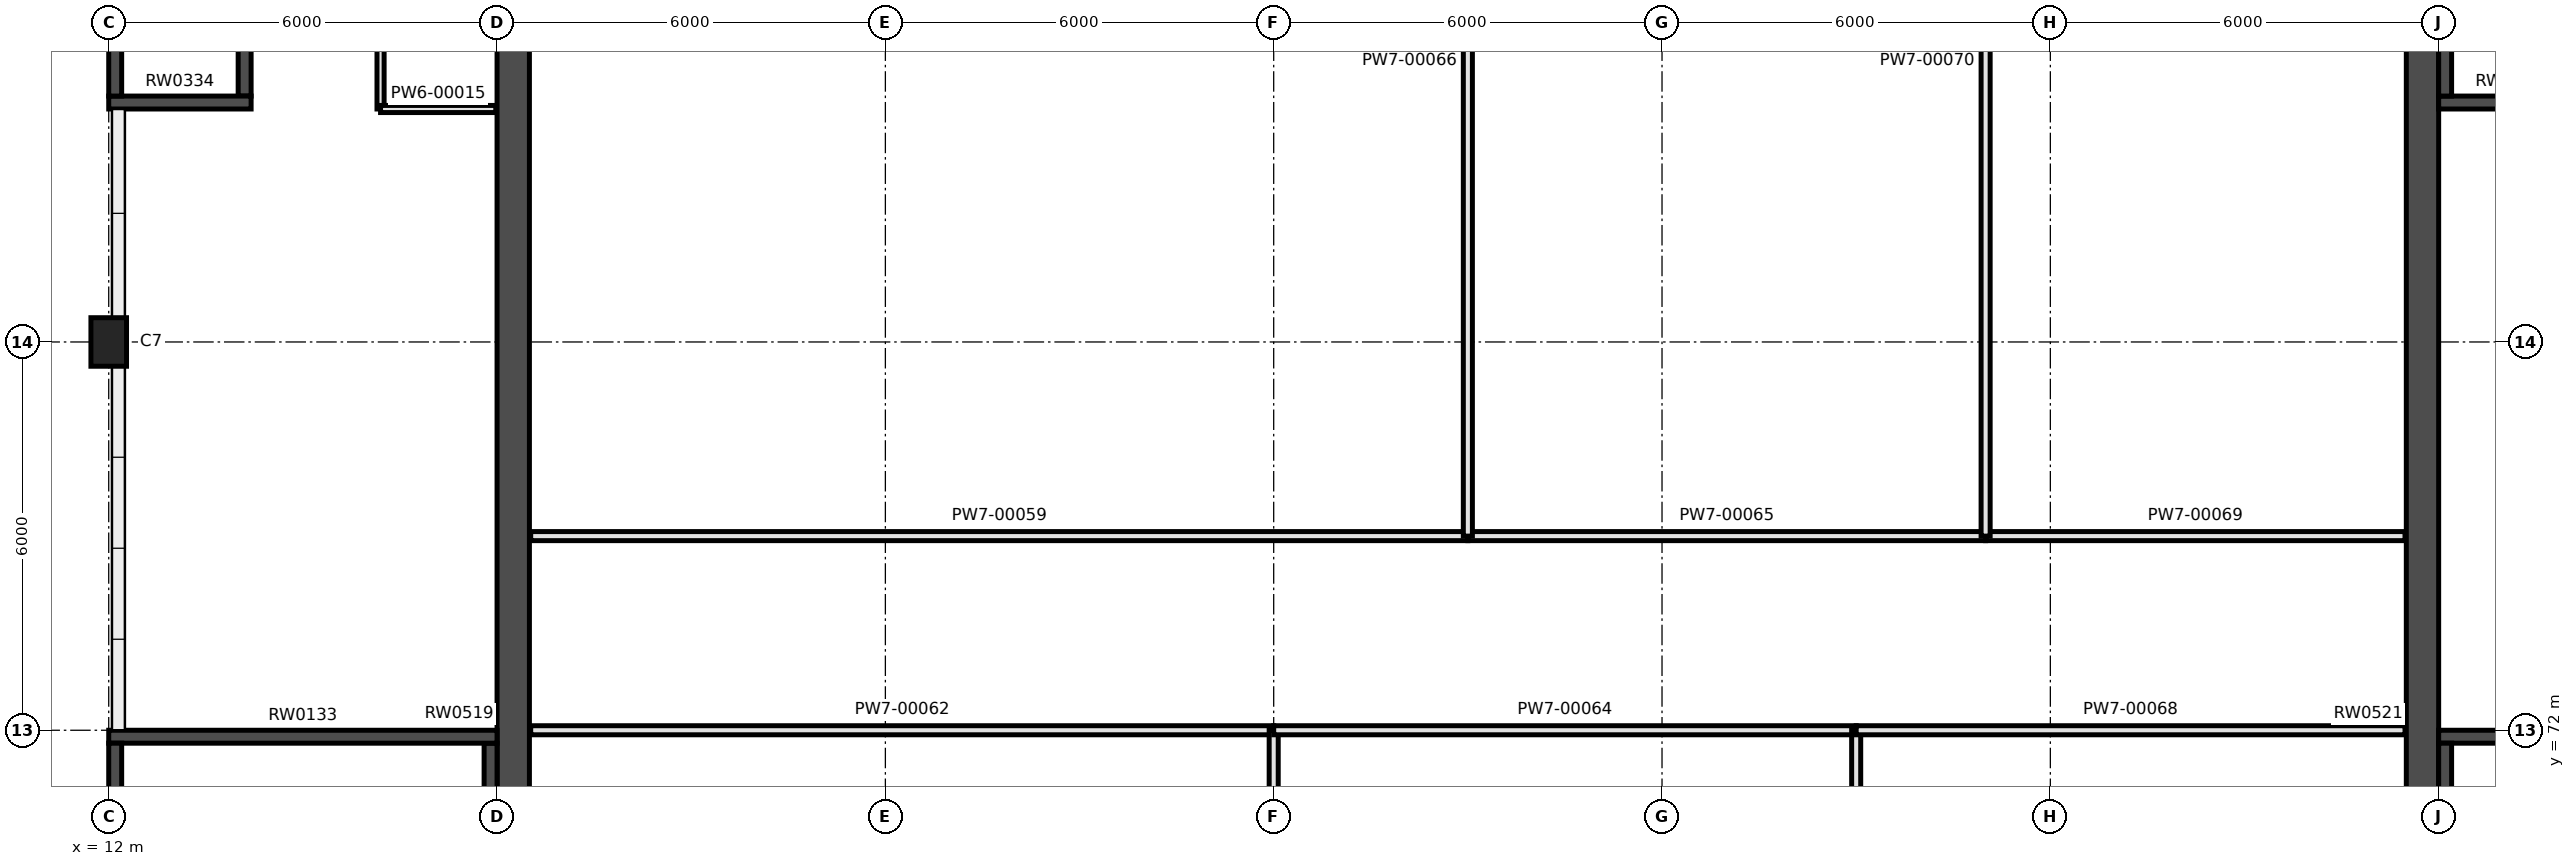
"""IFC4 building model, lengths in metres.
Left out: names, types, materials, properties, quantities, classifications, styles, units other than length and angle.
Written with IfcOpenShell. Run it as: python <this file> out.ifc"""

import sys

from ifc_helpers import new_model, si_unit, direction, frame, frame_2d, origin, origin_2d, place, context, subcontext, project, spatial, rectangle, extrude, element, fill, save


model = new_model("IFC4")
c1 = context("Model", 3, precision=1e-05, world=origin(), true_north=direction((0.0, 1.0)))
c2 = subcontext(c1, "Body", "Model", "MODEL_VIEW")
j1 = project(units=[si_unit("LENGTHUNIT", "METRE"), si_unit("PLANEANGLEUNIT", "RADIAN")], contexts=[c1])
p1 = place(None, origin())
s1 = spatial("IfcSite", under=j1, at=p1, CompositionType="ELEMENT")
p2 = place(p1, origin())
s2 = spatial("IfcBuilding", under=s1, at=p2, CompositionType="ELEMENT")
p3 = place(p2, origin())
s3 = spatial("IfcBuildingStorey", under=s2, at=p3, CompositionType="ELEMENT", Elevation=0.0)
p4 = place(p3, frame((12.0, 78.0, -0.3), z_axis=(0.0, 0.0, 1.0), x_axis=(1.0, 0.0, 0.0)))
e1 = element("IfcColumn", 1, at=p4, inside=s3, PredefinedType="COLUMN", context=c2, shape_type="SweptSolid", body=[
    extrude(rectangle(XDim=0.55, YDim=0.75, at=origin_2d()), origin(), (0.0, 0.0, 1.0), 7.3),
])
p5 = place(p3, frame((12.0, 71.9, -0.3), z_axis=(0.0, 0.0, 1.0), x_axis=(1.0, 0.0, 0.0)))
e2 = element("IfcWall", 2, at=p5, inside=s3, PredefinedType="SHEAR", context=c2, shape_type="SweptSolid", body=[
    extrude(rectangle(XDim=6.0, YDim=0.2, at=frame_2d((3.0, 0.0))), origin(), (0.0, 0.0, 1.0), 7.3),
])
p6 = place(p5, frame((0.3, 0.0, 0.3)))
e3 = element("IfcOpeningElement", 3, at=p6, cuts=e2, PredefinedType="OPENING", context=c2, shape_type="SweptSolid", body=[
    extrude(rectangle(XDim=1.1, YDim=2.2, at=frame_2d((0.55, 1.1))), frame((0.0, 0.11, 0.0), z_axis=(0.0, -1.0, 0.0), x_axis=(1.0, 0.0, 0.0)), (0.0, 0.0, 1.0), 0.22),
])
p7 = place(p3, frame((12.1, 66.2, -0.3), z_axis=(0.0, 0.0, 1.0), x_axis=(0.0, 1.0, 0.0)))
e4 = element("IfcWall", 4, at=p7, inside=s3, PredefinedType="SHEAR", context=c2, shape_type="SweptSolid", body=[
    extrude(rectangle(XDim=5.6, YDim=0.2, at=frame_2d((2.8, 0.0))), origin(), (0.0, 0.0, 1.0), 7.3),
])
p8 = place(p7, frame((1.9, 0.0, 0.3)))
e5 = element("IfcOpeningElement", 5, at=p8, cuts=e4, PredefinedType="OPENING", context=c2, shape_type="SweptSolid", body=[
    extrude(rectangle(XDim=1.8, YDim=2.4, at=frame_2d((0.9, 1.2))), frame((0.0, 0.11, 0.0), z_axis=(0.0, -1.0, 0.0), x_axis=(1.0, 0.0, 0.0)), (0.0, 0.0, 1.0), 0.22),
])
p9 = place(p3, frame((17.9, 66.2, -0.3), z_axis=(0.0, 0.0, 1.0), x_axis=(0.0, 1.0, 0.0)))
e6 = element("IfcWall", 6, at=p9, inside=s3, PredefinedType="SHEAR", context=c2, shape_type="SweptSolid", body=[
    extrude(rectangle(XDim=5.6, YDim=0.2, at=frame_2d((2.8, 0.0))), origin(), (0.0, 0.0, 1.0), 7.3),
])
p10 = place(p3, frame((48.0, 71.9, -0.3), z_axis=(0.0, 0.0, 1.0), x_axis=(1.0, 0.0, 0.0)))
e7 = element("IfcWall", 7, at=p10, inside=s3, PredefinedType="SHEAR", context=c2, shape_type="SweptSolid", body=[
    extrude(rectangle(XDim=6.0, YDim=0.2, at=frame_2d((3.0, 0.0))), origin(), (0.0, 0.0, 1.0), 7.3),
])
p11 = place(p10, frame((4.6, 0.0, 0.3)))
e8 = element("IfcOpeningElement", 8, at=p11, cuts=e7, PredefinedType="OPENING", context=c2, shape_type="SweptSolid", body=[
    extrude(rectangle(XDim=1.1, YDim=2.2, at=frame_2d((0.55, 1.1))), frame((0.0, 0.11, 0.0), z_axis=(0.0, -1.0, 0.0), x_axis=(1.0, 0.0, 0.0)), (0.0, 0.0, 1.0), 0.22),
])
p12 = place(p3, frame((48.1, 66.2, -0.3), z_axis=(0.0, 0.0, 1.0), x_axis=(0.0, 1.0, 0.0)))
e9 = element("IfcWall", 9, at=p12, inside=s3, PredefinedType="SHEAR", context=c2, shape_type="SweptSolid", body=[
    extrude(rectangle(XDim=5.6, YDim=0.2, at=frame_2d((2.8, 0.0))), origin(), (0.0, 0.0, 1.0), 7.3),
])
p13 = place(p3, frame((12.0, 81.7, -1.4), z_axis=(0.0, 0.0, 1.0), x_axis=(1.0, 0.0, 0.0)))
e10 = element("IfcWall", 10, at=p13, inside=s3, PredefinedType="SHEAR", context=c2, shape_type="SweptSolid", body=[
    extrude(rectangle(XDim=2.2, YDim=0.2, at=frame_2d((1.1, 0.0))), origin(), (0.0, 0.0, 1.0), 8.4),
])
p14 = place(p13, frame((0.55, 0.0, 1.4)))
e11 = element("IfcOpeningElement", 11, at=p14, cuts=e10, PredefinedType="OPENING", context=c2, shape_type="SweptSolid", body=[
    extrude(rectangle(XDim=1.1, YDim=2.1, at=frame_2d((0.55, 1.05))), frame((0.0, 0.11, 0.0), z_axis=(0.0, -1.0, 0.0), x_axis=(1.0, 0.0, 0.0)), (0.0, 0.0, 1.0), 0.22),
])
for number, where, z_axis, x_axis in (
    (12, (12.1, 81.8, -1.4), (0.0, 0.0, 1.0), (0.0, 1.0, 0.0)),
    (13, (14.1, 81.8, -1.4), (0.0, 0.0, 1.0), (0.0, 1.0, 0.0)),
):
    element("IfcWall", number, at=place(p3, frame(where, z_axis=z_axis, x_axis=x_axis)), inside=s3, PredefinedType="SHEAR", context=c2, shape_type="SweptSolid", body=[
        extrude(rectangle(XDim=2.0, YDim=0.2, at=frame_2d((1.0, 0.0))), origin(), (0.0, 0.0, 1.0), 8.4),
    ])
p15 = place(p3, frame((48.0, 81.7, -1.4), z_axis=(0.0, 0.0, 1.0), x_axis=(1.0, 0.0, 0.0)))
e14 = element("IfcWall", 14, at=p15, inside=s3, PredefinedType="SHEAR", context=c2, shape_type="SweptSolid", body=[
    extrude(rectangle(XDim=2.2, YDim=0.2, at=frame_2d((1.1, 0.0))), origin(), (0.0, 0.0, 1.0), 8.4),
])
p16 = place(p15, frame((0.55, 0.0, 1.4)))
e15 = element("IfcOpeningElement", 15, at=p16, cuts=e14, PredefinedType="OPENING", context=c2, shape_type="SweptSolid", body=[
    extrude(rectangle(XDim=1.1, YDim=2.1, at=frame_2d((0.55, 1.05))), frame((0.0, 0.11, 0.0), z_axis=(0.0, -1.0, 0.0), x_axis=(1.0, 0.0, 0.0)), (0.0, 0.0, 1.0), 0.22),
])
p17 = place(p3, frame((48.1, 81.8, -1.4), z_axis=(0.0, 0.0, 1.0), x_axis=(0.0, 1.0, 0.0)))
e16 = element("IfcWall", 16, at=p17, inside=s3, PredefinedType="SHEAR", context=c2, shape_type="SweptSolid", body=[
    extrude(rectangle(XDim=2.0, YDim=0.2, at=frame_2d((1.0, 0.0))), origin(), (0.0, 0.0, 1.0), 8.4),
])
p18 = place(p3, frame((18.25, 54.5, -0.3), z_axis=(0.0, 0.0, 1.0), x_axis=(0.0, 1.0, 0.0)))
e17 = element("IfcWall", 17, at=p18, inside=s3, PredefinedType="SHEAR", context=c2, shape_type="SweptSolid", body=[
    extrude(rectangle(XDim=35.5, YDim=0.5, at=frame_2d((17.75, 0.0))), origin(), (0.0, 0.0, 1.0), 7.3),
])
p19 = place(p18, frame((1.55, 0.0, 0.3)))
e18 = element("IfcOpeningElement", 18, at=p19, cuts=e17, PredefinedType="OPENING", context=c2, shape_type="SweptSolid", body=[
    extrude(rectangle(XDim=1.8, YDim=2.1, at=frame_2d((0.9, 1.05))), frame((0.0, 0.26, 0.0), z_axis=(0.0, -1.0, 0.0), x_axis=(1.0, 0.0, 0.0)), (0.0, 0.0, 1.0), 0.52),
])
p20 = place(p18, frame((18.05, 0.0, 0.3)))
e19 = element("IfcOpeningElement", 19, at=p20, cuts=e17, PredefinedType="OPENING", context=c2, shape_type="SweptSolid", body=[
    extrude(rectangle(XDim=1.8, YDim=2.1, at=frame_2d((0.9, 1.05))), frame((0.0, 0.26, 0.0), z_axis=(0.0, -1.0, 0.0), x_axis=(1.0, 0.0, 0.0)), (0.0, 0.0, 1.0), 0.52),
])
p21 = place(p3, frame((47.75, 54.5, -0.3), z_axis=(0.0, 0.0, 1.0), x_axis=(0.0, 1.0, 0.0)))
e20 = element("IfcWall", 20, at=p21, inside=s3, PredefinedType="SHEAR", context=c2, shape_type="SweptSolid", body=[
    extrude(rectangle(XDim=35.5, YDim=0.5, at=frame_2d((17.75, 0.0))), origin(), (0.0, 0.0, 1.0), 7.3),
])
p22 = place(p21, frame((18.05, 0.0, 0.3)))
e21 = element("IfcOpeningElement", 21, at=p22, cuts=e20, PredefinedType="OPENING", context=c2, shape_type="SweptSolid", body=[
    extrude(rectangle(XDim=1.8, YDim=2.1, at=frame_2d((0.9, 1.05))), frame((0.0, 0.26, 0.0), z_axis=(0.0, -1.0, 0.0), x_axis=(1.0, 0.0, 0.0)), (0.0, 0.0, 1.0), 0.52),
])
p23 = place(p21, frame((3.6, 0.0, 0.3)))
e22 = element("IfcOpeningElement", 22, at=p23, cuts=e20, PredefinedType="OPENING", context=c2, shape_type="SweptSolid", body=[
    extrude(rectangle(XDim=1.0, YDim=2.1, at=frame_2d((0.5, 1.05))), frame((0.0, 0.26, 0.0), z_axis=(0.0, -1.0, 0.0), x_axis=(1.0, 0.0, 0.0)), (0.0, 0.0, 1.0), 0.52),
])
p24 = place(p3, frame((16.2, 81.6, 0.0), z_axis=(0.0, 0.0, 1.0), x_axis=(0.0, 1.0, 0.0)))
e23 = element("IfcWall", 23, at=p24, inside=s3, PredefinedType="PARTITIONING", context=c2, shape_type="SweptSolid", body=[
    extrude(rectangle(XDim=2.4, YDim=0.11, at=frame_2d((1.2, 0.0))), origin(), (0.0, 0.0, 1.0), 6.15),
])
p25 = place(p24, frame((0.85, 0.0, 0.0)))
e24 = element("IfcOpeningElement", 24, at=p25, cuts=e23, PredefinedType="OPENING", context=c2, shape_type="SweptSolid", body=[
    extrude(rectangle(XDim=0.75, YDim=2.04, at=frame_2d((0.375, 1.02))), frame((0.0, 0.065, 0.0), z_axis=(0.0, -1.0, 0.0), x_axis=(1.0, 0.0, 0.0)), (0.0, 0.0, 1.0), 0.13),
])
p26 = place(p3, frame((16.2, 81.6, 0.0), z_axis=(0.0, 0.0, 1.0), x_axis=(1.0, 0.0, 0.0)))
e25 = element("IfcWall", 25, at=p26, inside=s3, PredefinedType="PARTITIONING", context=c2, shape_type="SweptSolid", body=[
    extrude(rectangle(XDim=1.78, YDim=0.11, at=frame_2d((0.89, 0.0))), origin(), (0.0, 0.0, 1.0), 6.75),
])
p27 = place(p3, frame((18.52, 75.0, 0.0), z_axis=(0.0, 0.0, 1.0), x_axis=(1.0, 0.0, 0.0)))
e26 = element("IfcWall", 26, at=p27, inside=s3, PredefinedType="PARTITIONING", context=c2, shape_type="SweptSolid", body=[
    extrude(rectangle(XDim=14.48, YDim=0.14, at=frame_2d((7.24, 0.0))), origin(), (0.0, 0.0, 1.0), 5.5),
])
p28 = place(p27, frame((6.03, 0.0, 0.0)))
e27 = element("IfcOpeningElement", 27, at=p28, cuts=e26, PredefinedType="OPENING", context=c2, shape_type="SweptSolid", body=[
    extrude(rectangle(XDim=1.8, YDim=2.1, at=frame_2d((0.9, 1.05))), frame((0.0, 0.08, 0.0), z_axis=(0.0, -1.0, 0.0), x_axis=(1.0, 0.0, 0.0)), (0.0, 0.0, 1.0), 0.16),
])
p29 = place(p3, frame((18.52, 72.0, 0.0), z_axis=(0.0, 0.0, 1.0), x_axis=(1.0, 0.0, 0.0)))
e28 = element("IfcWall", 28, at=p29, inside=s3, PredefinedType="PARTITIONING", context=c2, shape_type="SweptSolid", body=[
    extrude(rectangle(XDim=11.48, YDim=0.14, at=frame_2d((5.74, 0.0))), origin(), (0.0, 0.0, 1.0), 3.924),
])
p30 = place(p29, frame((4.93, 0.0, 0.0)))
e29 = element("IfcOpeningElement", 29, at=p30, cuts=e28, PredefinedType="OPENING", context=c2, shape_type="SweptSolid", body=[
    extrude(rectangle(XDim=1.0, YDim=2.1, at=frame_2d((0.5, 1.05))), frame((0.0, 0.08, 0.0), z_axis=(0.0, -1.0, 0.0), x_axis=(1.0, 0.0, 0.0)), (0.0, 0.0, 1.0), 0.16),
])
p31 = place(p3, frame((30.0, 60.0, 0.0), z_axis=(0.0, 0.0, 1.0), x_axis=(0.0, 1.0, 0.0)))
e30 = element("IfcWall", 30, at=p31, inside=s3, PredefinedType="PARTITIONING", context=c2, shape_type="SweptSolid", body=[
    extrude(rectangle(XDim=12.0, YDim=0.14, at=frame_2d((6.0, 0.0))), origin(), (0.0, 0.0, 1.0), 2.964),
])
p32 = place(p3, frame((30.0, 72.0, 0.0), z_axis=(0.0, 0.0, 1.0), x_axis=(1.0, 0.0, 0.0)))
e31 = element("IfcWall", 31, at=p32, inside=s3, PredefinedType="PARTITIONING", context=c2, shape_type="SweptSolid", body=[
    extrude(rectangle(XDim=9.0, YDim=0.14, at=frame_2d((4.5, 0.0))), origin(), (0.0, 0.0, 1.0), 3.924),
])
p33 = place(p32, frame((3.95, 0.0, 0.0)))
e32 = element("IfcOpeningElement", 32, at=p33, cuts=e31, PredefinedType="OPENING", context=c2, shape_type="SweptSolid", body=[
    extrude(rectangle(XDim=1.0, YDim=2.1, at=frame_2d((0.5, 1.05))), frame((0.0, 0.08, 0.0), z_axis=(0.0, -1.0, 0.0), x_axis=(1.0, 0.0, 0.0)), (0.0, 0.0, 1.0), 0.16),
])
p34 = place(p3, frame((33.0, 75.0, 0.0), z_axis=(0.0, 0.0, 1.0), x_axis=(1.0, 0.0, 0.0)))
e33 = element("IfcWall", 33, at=p34, inside=s3, PredefinedType="PARTITIONING", context=c2, shape_type="SweptSolid", body=[
    extrude(rectangle(XDim=8.0, YDim=0.14, at=frame_2d((4.0, 0.0))), origin(), (0.0, 0.0, 1.0), 5.5),
])
p35 = place(p3, frame((33.0, 75.0, 0.0), z_axis=(0.0, 0.0, 1.0), x_axis=(0.0, 1.0, 0.0)))
e34 = element("IfcWall", 34, at=p35, inside=s3, PredefinedType="PARTITIONING", context=c2, shape_type="SweptSolid", body=[
    extrude(rectangle(XDim=14.68, YDim=0.14, at=frame_2d((7.34, 0.0))), origin(), (0.0, 0.0, 1.0), 4.404),
])
p36 = place(p3, frame((39.0, 60.0, 0.0), z_axis=(0.0, 0.0, 1.0), x_axis=(0.0, 1.0, 0.0)))
e35 = element("IfcWall", 35, at=p36, inside=s3, PredefinedType="PARTITIONING", context=c2, shape_type="SweptSolid", body=[
    extrude(rectangle(XDim=12.0, YDim=0.14, at=frame_2d((6.0, 0.0))), origin(), (0.0, 0.0, 1.0), 2.964),
])
p37 = place(p3, frame((39.0, 72.0, 0.0), z_axis=(0.0, 0.0, 1.0), x_axis=(1.0, 0.0, 0.0)))
e36 = element("IfcWall", 36, at=p37, inside=s3, PredefinedType="PARTITIONING", context=c2, shape_type="SweptSolid", body=[
    extrude(rectangle(XDim=8.48, YDim=0.14, at=frame_2d((4.24, 0.0))), origin(), (0.0, 0.0, 1.0), 3.924),
])
p38 = place(p37, frame((3.95, 0.0, 0.0)))
e37 = element("IfcOpeningElement", 37, at=p38, cuts=e36, PredefinedType="OPENING", context=c2, shape_type="SweptSolid", body=[
    extrude(rectangle(XDim=1.0, YDim=2.1, at=frame_2d((0.5, 1.05))), frame((0.0, 0.08, 0.0), z_axis=(0.0, -1.0, 0.0), x_axis=(1.0, 0.0, 0.0)), (0.0, 0.0, 1.0), 0.16),
])
p39 = place(p3, frame((41.0, 75.0, 0.0), z_axis=(0.0, 0.0, 1.0), x_axis=(1.0, 0.0, 0.0)))
e38 = element("IfcWall", 38, at=p39, inside=s3, PredefinedType="PARTITIONING", context=c2, shape_type="SweptSolid", body=[
    extrude(rectangle(XDim=6.48, YDim=0.14, at=frame_2d((3.24, 0.0))), origin(), (0.0, 0.0, 1.0), 5.5),
])
p40 = place(p39, frame((2.95, 0.0, 0.0)))
e39 = element("IfcOpeningElement", 39, at=p40, cuts=e38, PredefinedType="OPENING", context=c2, shape_type="SweptSolid", body=[
    extrude(rectangle(XDim=1.0, YDim=2.1, at=frame_2d((0.5, 1.05))), frame((0.0, 0.08, 0.0), z_axis=(0.0, -1.0, 0.0), x_axis=(1.0, 0.0, 0.0)), (0.0, 0.0, 1.0), 0.16),
])
p41 = place(p3, frame((41.0, 75.0, 0.0), z_axis=(0.0, 0.0, 1.0), x_axis=(0.0, 1.0, 0.0)))
e40 = element("IfcWall", 40, at=p41, inside=s3, PredefinedType="PARTITIONING", context=c2, shape_type="SweptSolid", body=[
    extrude(rectangle(XDim=14.68, YDim=0.14, at=frame_2d((7.34, 0.0))), origin(), (0.0, 0.0, 1.0), 4.404),
])
p42 = place(p28, origin())
e41 = element("IfcDoor", 41, at=p42, inside=s3, OperationType="DOUBLE_DOOR_SINGLE_SWING", PredefinedType="DOOR", context=c2, shape_type="SweptSolid", body=[
    extrude(rectangle(XDim=1.8, YDim=2.1, at=frame_2d((0.9, 1.05))), frame((0.0, 0.025, 0.0), z_axis=(0.0, -1.0, 0.0), x_axis=(1.0, 0.0, 0.0)), (0.0, 0.0, 1.0), 0.05),
])
fill(e27, e41)
p43 = place(p40, origin())
e42 = element("IfcDoor", 42, at=p43, inside=s3, OperationType="SINGLE_SWING_RIGHT", PredefinedType="DOOR", context=c2, shape_type="SweptSolid", body=[
    extrude(rectangle(XDim=1.0, YDim=2.1, at=frame_2d((0.5, 1.05))), frame((0.0, 0.025, 0.0), z_axis=(0.0, -1.0, 0.0), x_axis=(1.0, 0.0, 0.0)), (0.0, 0.0, 1.0), 0.05),
])
fill(e39, e42)
p44 = place(p30, frame((1.0, 0.0, 0.0), z_axis=(0.0, 0.0, 1.0), x_axis=(-1.0, 0.0, 0.0)))
e43 = element("IfcDoor", 43, at=p44, inside=s3, OperationType="SINGLE_SWING_LEFT", PredefinedType="DOOR", context=c2, shape_type="SweptSolid", body=[
    extrude(rectangle(XDim=1.0, YDim=2.1, at=frame_2d((0.5, 1.05))), frame((0.0, 0.025, 0.0), z_axis=(0.0, -1.0, 0.0), x_axis=(1.0, 0.0, 0.0)), (0.0, 0.0, 1.0), 0.05),
])
fill(e29, e43)
p45 = place(p33, frame((1.0, 0.0, 0.0), z_axis=(0.0, 0.0, 1.0), x_axis=(-1.0, 0.0, 0.0)))
e44 = element("IfcDoor", 44, at=p45, inside=s3, OperationType="SINGLE_SWING_LEFT", PredefinedType="DOOR", context=c2, shape_type="SweptSolid", body=[
    extrude(rectangle(XDim=1.0, YDim=2.1, at=frame_2d((0.5, 1.05))), frame((0.0, 0.025, 0.0), z_axis=(0.0, -1.0, 0.0), x_axis=(1.0, 0.0, 0.0)), (0.0, 0.0, 1.0), 0.05),
])
fill(e32, e44)
p46 = place(p38, frame((1.0, 0.0, 0.0), z_axis=(0.0, 0.0, 1.0), x_axis=(-1.0, 0.0, 0.0)))
e45 = element("IfcDoor", 45, at=p46, inside=s3, OperationType="SINGLE_SWING_LEFT", PredefinedType="DOOR", context=c2, shape_type="SweptSolid", body=[
    extrude(rectangle(XDim=1.0, YDim=2.1, at=frame_2d((0.5, 1.05))), frame((0.0, 0.025, 0.0), z_axis=(0.0, -1.0, 0.0), x_axis=(1.0, 0.0, 0.0)), (0.0, 0.0, 1.0), 0.05),
])
fill(e37, e45)
p47 = place(p6, frame((1.1, 0.0, 0.0), z_axis=(0.0, 0.0, 1.0), x_axis=(-1.0, 0.0, 0.0)))
e46 = element("IfcDoor", 46, at=p47, inside=s3, OperationType="SINGLE_SWING_LEFT", PredefinedType="DOOR", context=c2, shape_type="SweptSolid", body=[
    extrude(rectangle(XDim=1.1, YDim=2.2, at=frame_2d((0.55, 1.1))), frame((0.0, 0.025, 0.0), z_axis=(0.0, -1.0, 0.0), x_axis=(1.0, 0.0, 0.0)), (0.0, 0.0, 1.0), 0.05),
])
fill(e3, e46)
p48 = place(p25, frame((0.75, 0.0, 0.0), z_axis=(0.0, 0.0, 1.0), x_axis=(-1.0, 0.0, 0.0)))
e47 = element("IfcDoor", 47, at=p48, inside=s3, OperationType="SINGLE_SWING_LEFT", PredefinedType="DOOR", context=c2, shape_type="SweptSolid", body=[
    extrude(rectangle(XDim=0.75, YDim=2.04, at=frame_2d((0.375, 1.02))), frame((0.0, 0.025, 0.0), z_axis=(0.0, -1.0, 0.0), x_axis=(1.0, 0.0, 0.0)), (0.0, 0.0, 1.0), 0.05),
])
fill(e24, e47)
p49 = place(p20, frame((1.8, 0.0, 0.0), z_axis=(0.0, 0.0, 1.0), x_axis=(-1.0, 0.0, 0.0)))
e48 = element("IfcDoor", 48, at=p49, inside=s3, OperationType="DOUBLE_DOOR_SINGLE_SWING", PredefinedType="DOOR", context=c2, shape_type="SweptSolid", body=[
    extrude(rectangle(XDim=1.8, YDim=2.1, at=frame_2d((0.9, 1.05))), frame((0.0, 0.025, 0.0), z_axis=(0.0, -1.0, 0.0), x_axis=(1.0, 0.0, 0.0)), (0.0, 0.0, 1.0), 0.05),
])
fill(e19, e48)
p50 = place(p22, origin())
e49 = element("IfcDoor", 49, at=p50, inside=s3, OperationType="DOUBLE_DOOR_SINGLE_SWING", PredefinedType="DOOR", context=c2, shape_type="SweptSolid", body=[
    extrude(rectangle(XDim=1.8, YDim=2.1, at=frame_2d((0.9, 1.05))), frame((0.0, 0.025, 0.0), z_axis=(0.0, -1.0, 0.0), x_axis=(1.0, 0.0, 0.0)), (0.0, 0.0, 1.0), 0.05),
])
fill(e21, e49)
p51 = place(p14, origin())
e50 = element("IfcDoor", 50, at=p51, inside=s3, OperationType="DOUBLE_DOOR_SLIDING", PredefinedType="DOOR", context=c2, shape_type="SweptSolid", body=[
    extrude(rectangle(XDim=1.1, YDim=2.1, at=frame_2d((0.55, 1.05))), frame((0.0, 0.025, 0.0), z_axis=(0.0, -1.0, 0.0), x_axis=(1.0, 0.0, 0.0)), (0.0, 0.0, 1.0), 0.05),
])
fill(e11, e50)
p52 = place(p16, origin())
e51 = element("IfcDoor", 51, at=p52, inside=s3, OperationType="DOUBLE_DOOR_SLIDING", PredefinedType="DOOR", context=c2, shape_type="SweptSolid", body=[
    extrude(rectangle(XDim=1.1, YDim=2.1, at=frame_2d((0.55, 1.05))), frame((0.0, 0.025, 0.0), z_axis=(0.0, -1.0, 0.0), x_axis=(1.0, 0.0, 0.0)), (0.0, 0.0, 1.0), 0.05),
])
fill(e15, e51)
save(model, sys.argv[1])
